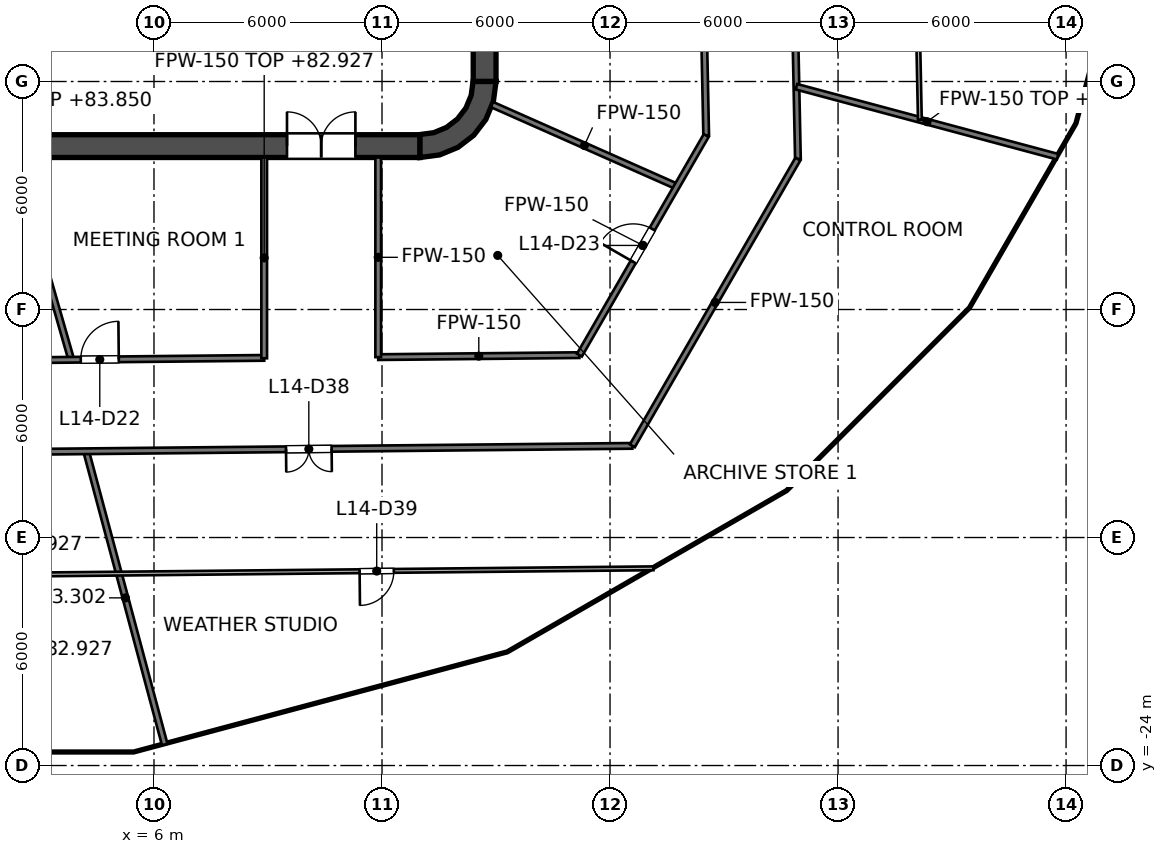
"""IFC4 building model, lengths in metres.
Left out: names, types, materials, properties, quantities, classifications, styles, units other than length and angle.
Written with IfcOpenShell. Run it as: python <this file> out.ifc"""

import sys

from ifc_helpers import new_model, si_unit, direction, frame, frame_2d, origin, place, context, subcontext, project, spatial, polyline, rectangle, outline, extrude, element, fill, save


model = new_model("IFC4")
c1 = context("Model", 3, precision=1e-05, world=origin(), true_north=direction((0.0, 1.0)))
c2 = subcontext(c1, "Body", "Model", "MODEL_VIEW")
j1 = project(units=[si_unit("LENGTHUNIT", "METRE"), si_unit("PLANEANGLEUNIT", "RADIAN")], contexts=[c1])
p1 = place(None, origin())
s1 = spatial("IfcSite", under=j1, at=p1, CompositionType="ELEMENT")
p2 = place(p1, origin())
s2 = spatial("IfcBuilding", under=s1, at=p2, CompositionType="ELEMENT")
p3 = place(p2, frame((0.0, 0.0, 79.8)))
s3 = spatial("IfcBuildingStorey", under=s2, at=p3, CompositionType="ELEMENT", Elevation=79.8)
p4 = place(p3, frame((-13.0, -7.7, 0.0), z_axis=(0.0, 0.0, 1.0), x_axis=(1.0, 0.0, 0.0)))
e1 = element("IfcWall", 1, at=p4, inside=s3, PredefinedType="SHEAR", context=c2, shape_type="SweptSolid", body=[
    extrude(rectangle(XDim=26.0, YDim=0.6, at=frame_2d((13.0, 0.0))), origin(), (0.0, 0.0, 1.0), 4.2),
])
p5 = place(p4, frame((1.7, 0.0, 0.0)))
e2 = element("IfcOpeningElement", 2, at=p5, cuts=e1, PredefinedType="OPENING", context=c2, shape_type="SweptSolid", body=[
    extrude(rectangle(XDim=1.8, YDim=2.1, at=frame_2d((0.9, 1.05))), frame((0.0, 0.3, 0.0), z_axis=(0.0, -1.0, 0.0), x_axis=(1.0, 0.0, 0.0)), (0.0, 0.0, 1.0), 0.6),
])
p6 = place(p4, frame((22.5, 0.0, 0.0)))
e3 = element("IfcOpeningElement", 3, at=p6, cuts=e1, PredefinedType="OPENING", context=c2, shape_type="SweptSolid", body=[
    extrude(rectangle(XDim=1.8, YDim=2.1, at=frame_2d((0.9, 1.05))), frame((0.0, 0.3, 0.0), z_axis=(0.0, -1.0, 0.0), x_axis=(1.0, 0.0, 0.0)), (0.0, 0.0, 1.0), 0.6),
])
p7 = place(p3, frame((14.7, -6.0, 0.0), z_axis=(0.0, 0.0, 1.0), x_axis=(0.0, 1.0, 0.0)))
e4 = element("IfcWall", 4, at=p7, inside=s3, PredefinedType="SHEAR", context=c2, shape_type="SweptSolid", body=[
    extrude(rectangle(XDim=12.0, YDim=0.6, at=frame_2d((6.0, 0.0))), origin(), (0.0, 0.0, 1.0), 4.2),
])
p8 = place(p3, origin())
e5 = element("IfcWall", 5, at=p8, inside=s3, PredefinedType="SHEAR", context=c2, shape_type="SweptSolid", body=[
    extrude(outline(polyline([(15.0, -6.0), (14.395, -6.0), (14.347, -6.361), (14.208, -6.698), (13.986, -6.986), (13.698, -7.208), (13.361, -7.347), (13.0, -7.395), (13.0, -8.0), (13.518, -7.932), (14.0, -7.732), (14.414, -7.414), (14.732, -7.0), (14.932, -6.518), (15.0, -6.0)])), origin(), (0.0, 0.0, 1.0), 4.2),
])
p9 = place(p3, frame((9.0, -6.6, 0.0), z_axis=(0.0, 0.0, 1.0), x_axis=(0.0, 1.0, 0.0)))
e6 = element("IfcWall", 6, at=p9, inside=s3, PredefinedType="SOLIDWALL", context=c2, shape_type="SweptSolid", body=[
    extrude(rectangle(XDim=2.5, YDim=0.25, at=frame_2d((1.25, 0.0))), origin(), (0.0, 0.0, 1.0), 4.05),
])
p10 = place(p9, frame((0.65, 0.0, 0.0)))
e7 = element("IfcOpeningElement", 7, at=p10, cuts=e6, PredefinedType="OPENING", context=c2, shape_type="SweptSolid", body=[
    extrude(rectangle(XDim=1.2, YDim=2.1, at=frame_2d((0.6, 1.05))), frame((0.0, 0.125, 0.0), z_axis=(0.0, -1.0, 0.0), x_axis=(1.0, 0.0, 0.0)), (0.0, 0.0, 1.0), 0.25),
])
p11 = place(p3, frame((-9.125, -7.0, 0.0), z_axis=(0.0, 0.0, 1.0), x_axis=(1.0, 0.0, 0.0)))
e8 = element("IfcWall", 8, at=p11, inside=s3, PredefinedType="SOLIDWALL", context=c2, shape_type="SweptSolid", body=[
    extrude(rectangle(XDim=18.25, YDim=0.8, at=frame_2d((9.125, 0.0))), origin(), (0.0, 0.0, 1.0), 4.05),
])
p12 = place(p3, frame((11.8, -7.4, 0.0), z_axis=(0.0, 0.0, 1.0), x_axis=(0.0, 1.0, 0.0)))
e9 = element("IfcWall", 9, at=p12, inside=s3, PredefinedType="SOLIDWALL", context=c2, shape_type="SweptSolid", body=[
    extrude(rectangle(XDim=14.8, YDim=0.4, at=frame_2d((7.4, 0.0))), origin(), (0.0, 0.0, 1.0), 4.05),
])
p13 = place(p12, frame((11.2, 0.0, 0.0)))
e10 = element("IfcOpeningElement", 10, at=p13, cuts=e9, PredefinedType="OPENING", context=c2, shape_type="SweptSolid", body=[
    extrude(rectangle(XDim=1.1, YDim=2.1, at=frame_2d((0.55, 1.05))), frame((0.0, 0.2, 0.0), z_axis=(0.0, -1.0, 0.0), x_axis=(1.0, 0.0, 0.0)), (0.0, 0.0, 1.0), 0.4),
])
p14 = place(p12, frame((8.3, 0.0, 0.0)))
e11 = element("IfcOpeningElement", 11, at=p14, cuts=e9, PredefinedType="OPENING", context=c2, shape_type="SweptSolid", body=[
    extrude(rectangle(XDim=1.1, YDim=2.1, at=frame_2d((0.55, 1.05))), frame((0.0, 0.2, 0.0), z_axis=(0.0, -1.0, 0.0), x_axis=(1.0, 0.0, 0.0)), (0.0, 0.0, 1.0), 0.4),
])
p15 = place(p12, frame((5.4, 0.0, 0.0)))
e12 = element("IfcOpeningElement", 12, at=p15, cuts=e9, PredefinedType="OPENING", context=c2, shape_type="SweptSolid", body=[
    extrude(rectangle(XDim=1.1, YDim=2.1, at=frame_2d((0.55, 1.05))), frame((0.0, 0.2, 0.0), z_axis=(0.0, -1.0, 0.0), x_axis=(1.0, 0.0, 0.0)), (0.0, 0.0, 1.0), 0.4),
])
p16 = place(p12, frame((13.552, 0.0, 0.0)))
e13 = element("IfcOpeningElement", 13, at=p16, cuts=e9, PredefinedType="OPENING", context=c2, shape_type="SweptSolid", body=[
    extrude(rectangle(XDim=0.9, YDim=2.1, at=frame_2d((0.45, 1.05))), frame((0.0, 0.2, 0.0), z_axis=(0.0, -1.0, 0.0), x_axis=(1.0, 0.0, 0.0)), (0.0, 0.0, 1.0), 0.4),
])
p17 = place(p12, frame((0.347, 0.0, 0.0)))
e14 = element("IfcOpeningElement", 14, at=p17, cuts=e9, PredefinedType="OPENING", context=c2, shape_type="SweptSolid", body=[
    extrude(rectangle(XDim=0.9, YDim=2.1, at=frame_2d((0.45, 1.05))), frame((0.0, 0.2, 0.0), z_axis=(0.0, -1.0, 0.0), x_axis=(1.0, 0.0, 0.0)), (0.0, 0.0, 1.0), 0.4),
])
e15 = element("IfcWall", 15, at=p8, inside=s3, PredefinedType="SOLIDWALL", context=c2, shape_type="SweptSolid", body=[
    extrude(outline(polyline([(12.0, -5.675), (12.0, -5.925), (14.15, -5.925), (14.4, -5.925), (14.4, -5.675), (14.4, -3.025), (14.4, -2.775), (14.4, -0.125), (14.4, 0.125), (14.4, 2.775), (14.4, 3.025), (14.4, 5.675), (14.4, 5.925), (14.15, 5.925), (12.0, 5.925), (12.0, 5.675), (14.15, 5.675), (14.15, 3.025), (12.0, 3.025), (12.0, 2.775), (14.15, 2.775), (14.15, 0.125), (12.0, 0.125), (12.0, -0.125), (14.15, -0.125), (14.15, -2.775), (12.0, -2.775), (12.0, -3.025), (14.15, -3.025), (14.15, -5.675), (12.0, -5.675)])), origin(), (0.0, 0.0, 1.0), 4.05),
])
p18 = place(p3, frame((20.167, 10.213, 0.0), z_axis=(0.0, 0.0, 1.0), x_axis=(0.020597058382, -0.999787858091, 0.0)))
e16 = element("IfcWall", 16, at=p18, inside=s3, PredefinedType="PARTITIONING", context=c2, shape_type="SweptSolid", body=[
    extrude(rectangle(XDim=17.637, YDim=0.15, at=frame_2d((8.819, 0.0))), origin(), (0.0, 0.0, 1.0), 3.118),
])
p19 = place(p18, frame((10.508, 0.0, 0.0)))
e17 = element("IfcOpeningElement", 17, at=p19, cuts=e16, PredefinedType="OPENING", context=c2, shape_type="SweptSolid", body=[
    extrude(rectangle(XDim=1.0, YDim=2.1, at=frame_2d((0.5, 1.05))), frame((0.0, 0.075, 0.0), z_axis=(0.0, -1.0, 0.0), x_axis=(1.0, 0.0, 0.0)), (0.0, 0.0, 1.0), 0.15),
])
p20 = place(p18, frame((5.09, 0.0, 0.0)))
e18 = element("IfcOpeningElement", 18, at=p20, cuts=e16, PredefinedType="OPENING", context=c2, shape_type="SweptSolid", body=[
    extrude(rectangle(XDim=1.0, YDim=2.1, at=frame_2d((0.5, 1.05))), frame((0.0, 0.075, 0.0), z_axis=(0.0, -1.0, 0.0), x_axis=(1.0, 0.0, 0.0)), (0.0, 0.0, 1.0), 0.15),
])
p21 = place(p3, frame((22.539, 11.615, 0.0), z_axis=(0.0, 0.0, 1.0), x_axis=(0.020589093921, -0.999788022138, 0.0)))
e19 = element("IfcWall", 19, at=p21, inside=s3, PredefinedType="PARTITIONING", context=c2, shape_type="SweptSolid", body=[
    extrude(rectangle(XDim=19.66, YDim=0.15, at=frame_2d((9.83, 0.0))), origin(), (0.0, 0.0, 1.0), 3.118),
])
p22 = place(p21, frame((15.745, 0.0, 0.0)))
e20 = element("IfcOpeningElement", 20, at=p22, cuts=e19, PredefinedType="OPENING", context=c2, shape_type="SweptSolid", body=[
    extrude(rectangle(XDim=1.0, YDim=2.1, at=frame_2d((0.5, 1.05))), frame((0.0, 0.075, 0.0), z_axis=(0.0, -1.0, 0.0), x_axis=(1.0, 0.0, 0.0)), (0.0, 0.0, 1.0), 0.15),
])
p23 = place(p21, frame((9.331, 0.0, 0.0)))
e21 = element("IfcOpeningElement", 21, at=p23, cuts=e19, PredefinedType="OPENING", context=c2, shape_type="SweptSolid", body=[
    extrude(rectangle(XDim=1.0, YDim=2.1, at=frame_2d((0.5, 1.05))), frame((0.0, 0.075, 0.0), z_axis=(0.0, -1.0, 0.0), x_axis=(1.0, 0.0, 0.0)), (0.0, 0.0, 1.0), 0.15),
])
p24 = place(p3, frame((4.215, -15.73, 0.0), z_axis=(0.0, 0.0, 1.0), x_axis=(0.258746779093, -0.965945187011, 0.0)))
e22 = element("IfcWall", 22, at=p24, inside=s3, PredefinedType="PARTITIONING", context=c2, shape_type="SweptSolid", body=[
    extrude(rectangle(XDim=7.988, YDim=0.15, at=frame_2d((3.994, 0.0))), origin(), (0.0, 0.0, 1.0), 3.502),
])
p25 = place(p3, frame((2.296, -8.0, 0.0), z_axis=(0.0, 0.0, 1.0), x_axis=(0.275935525478, -0.961176147113, 0.0)))
e23 = element("IfcWall", 23, at=p25, inside=s3, PredefinedType="PARTITIONING", context=c2, shape_type="SweptSolid", body=[
    extrude(rectangle(XDim=5.548, YDim=0.15, at=frame_2d((2.774, 0.0))), origin(), (0.0, 0.0, 1.0), 4.05),
])
p26 = place(p3, frame((14.895, -6.607, 0.0), z_axis=(0.0, 0.0, 1.0), x_axis=(0.914233271379, -0.405188259337, 0.0)))
e24 = element("IfcWall", 24, at=p26, inside=s3, PredefinedType="PARTITIONING", context=c2, shape_type="SweptSolid", body=[
    extrude(rectangle(XDim=5.317, YDim=0.15, at=frame_2d((2.659, 0.0))), origin(), (0.0, 0.0, 1.0), 3.195),
])
p27 = place(p3, frame((22.905, -6.138, 0.0), z_axis=(0.0, 0.0, 1.0), x_axis=(0.965925533901, -0.258820136309, 0.0)))
e25 = element("IfcWall", 25, at=p27, inside=s3, PredefinedType="PARTITIONING", context=c2, shape_type="SweptSolid", body=[
    extrude(rectangle(XDim=7.114, YDim=0.15, at=frame_2d((3.557, 0.0))), origin(), (0.0, 0.0, 1.0), 3.727),
])
p28 = place(p3, frame((-14.534, -15.916, 0.0), z_axis=(0.0, 0.0, 1.0), x_axis=(0.99995100325, 0.009899045409, 0.0)))
e26 = element("IfcWall", 26, at=p28, inside=s3, PredefinedType="PARTITIONING", context=c2, shape_type="SweptSolid", body=[
    extrude(rectangle(XDim=33.123, YDim=0.15, at=frame_2d((16.561, 0.0))), origin(), (0.0, 0.0, 1.0), 3.127),
])
p29 = place(p28, frame((5.927, 0.0, 0.0)))
e27 = element("IfcOpeningElement", 27, at=p29, cuts=e26, PredefinedType="OPENING", context=c2, shape_type="SweptSolid", body=[
    extrude(rectangle(XDim=1.0, YDim=2.1, at=frame_2d((0.5, 1.05))), frame((0.0, 0.075, 0.0), z_axis=(0.0, -1.0, 0.0), x_axis=(1.0, 0.0, 0.0)), (0.0, 0.0, 1.0), 0.15),
])
p30 = place(p28, frame((15.202, 0.0, 0.0)))
e28 = element("IfcOpeningElement", 28, at=p30, cuts=e26, PredefinedType="OPENING", context=c2, shape_type="SweptSolid", body=[
    extrude(rectangle(XDim=1.0, YDim=2.1, at=frame_2d((0.5, 1.05))), frame((0.0, 0.075, 0.0), z_axis=(0.0, -1.0, 0.0), x_axis=(1.0, 0.0, 0.0)), (0.0, 0.0, 1.0), 0.15),
])
p31 = place(p28, frame((24.01, 0.0, 0.0)))
e29 = element("IfcOpeningElement", 29, at=p31, cuts=e26, PredefinedType="OPENING", context=c2, shape_type="SweptSolid", body=[
    extrude(rectangle(XDim=1.2, YDim=2.1, at=frame_2d((0.6, 1.05))), frame((0.0, 0.075, 0.0), z_axis=(0.0, -1.0, 0.0), x_axis=(1.0, 0.0, 0.0)), (0.0, 0.0, 1.0), 0.15),
])
p32 = place(p3, frame((-8.9, -13.449, 0.0), z_axis=(0.0, 0.0, 1.0), x_axis=(0.999950969978, 0.009902405776, 0.0)))
e30 = element("IfcWall", 30, at=p32, inside=s3, PredefinedType="PARTITIONING", context=c2, shape_type="SweptSolid", body=[
    extrude(rectangle(XDim=17.801, YDim=0.15, at=frame_2d((8.9, 0.0))), origin(), (0.0, 0.0, 1.0), 3.127),
])
p33 = place(p32, frame((3.818, 0.0, 0.0)))
e31 = element("IfcOpeningElement", 31, at=p33, cuts=e30, PredefinedType="OPENING", context=c2, shape_type="SweptSolid", body=[
    extrude(rectangle(XDim=1.0, YDim=2.1, at=frame_2d((0.5, 1.05))), frame((0.0, 0.075, 0.0), z_axis=(0.0, -1.0, 0.0), x_axis=(1.0, 0.0, 0.0)), (0.0, 0.0, 1.0), 0.15),
])
p34 = place(p32, frame((8.391, 0.0, 0.0)))
e32 = element("IfcOpeningElement", 32, at=p34, cuts=e30, PredefinedType="OPENING", context=c2, shape_type="SweptSolid", body=[
    extrude(rectangle(XDim=1.0, YDim=2.1, at=frame_2d((0.5, 1.05))), frame((0.0, 0.075, 0.0), z_axis=(0.0, -1.0, 0.0), x_axis=(1.0, 0.0, 0.0)), (0.0, 0.0, 1.0), 0.15),
])
p35 = place(p32, frame((12.974, 0.0, 0.0)))
e33 = element("IfcOpeningElement", 33, at=p35, cuts=e30, PredefinedType="OPENING", context=c2, shape_type="SweptSolid", body=[
    extrude(rectangle(XDim=1.0, YDim=2.1, at=frame_2d((0.5, 1.05))), frame((0.0, 0.075, 0.0), z_axis=(0.0, -1.0, 0.0), x_axis=(1.0, 0.0, 0.0)), (0.0, 0.0, 1.0), 0.15),
])
p36 = place(p3, frame((11.9, -13.253, 0.0), z_axis=(0.0, 0.0, 1.0), x_axis=(0.999951309192, 0.009868092237, 0.0)))
e34 = element("IfcWall", 34, at=p36, inside=s3, PredefinedType="PARTITIONING", context=c2, shape_type="SweptSolid", body=[
    extrude(rectangle(XDim=5.294, YDim=0.15, at=frame_2d((2.647, 0.0))), origin(), (0.0, 0.0, 1.0), 3.195),
])
p37 = place(p3, frame((18.587, -15.587, 0.0), z_axis=(0.0, 0.0, 1.0), x_axis=(0.499993286632, 0.866029279715, 0.0)))
e35 = element("IfcWall", 35, at=p37, inside=s3, PredefinedType="PARTITIONING", context=c2, shape_type="SweptSolid", body=[
    extrude(rectangle(XDim=8.713, YDim=0.15, at=frame_2d((4.357, 0.0))), origin(), (0.0, 0.0, 1.0), 3.195),
])
p38 = place(p3, frame((17.194, -13.201, 0.0), z_axis=(0.0, 0.0, 1.0), x_axis=(0.499983182885, 0.866035112932, 0.0)))
e36 = element("IfcWall", 36, at=p38, inside=s3, PredefinedType="PARTITIONING", context=c2, shape_type="SweptSolid", body=[
    extrude(rectangle(XDim=6.674, YDim=0.15, at=frame_2d((3.337, 0.0))), origin(), (0.0, 0.0, 1.0), 3.195),
])
p39 = place(p38, frame((2.834, 0.0, 0.0)))
e37 = element("IfcOpeningElement", 37, at=p39, cuts=e36, PredefinedType="OPENING", context=c2, shape_type="SweptSolid", body=[
    extrude(rectangle(XDim=1.0, YDim=2.1, at=frame_2d((0.5, 1.05))), frame((0.0, 0.075, 0.0), z_axis=(0.0, -1.0, 0.0), x_axis=(1.0, 0.0, 0.0)), (0.0, 0.0, 1.0), 0.15),
])
p40 = place(p3, frame((11.9, -13.253, 0.0), z_axis=(0.0, 0.0, 1.0), x_axis=(0.0, 1.0, 0.0)))
e38 = element("IfcWall", 38, at=p40, inside=s3, PredefinedType="PARTITIONING", context=c2, shape_type="SweptSolid", body=[
    extrude(rectangle(XDim=5.253, YDim=0.15, at=frame_2d((2.626, 0.0))), origin(), (0.0, 0.0, 1.0), 3.195),
])
p41 = place(p3, frame((8.9, -13.283, 0.0), z_axis=(0.0, 0.0, 1.0), x_axis=(0.0, 1.0, 0.0)))
e39 = element("IfcWall", 39, at=p41, inside=s3, PredefinedType="PARTITIONING", context=c2, shape_type="SweptSolid", body=[
    extrude(rectangle(XDim=5.283, YDim=0.15, at=frame_2d((2.642, 0.0))), origin(), (0.0, 0.0, 1.0), 3.127),
])
p42 = place(p3, frame((25.731, 13.502, 0.0), z_axis=(0.0, 0.0, 1.0), x_axis=(0.020564874759, -0.999788520601, 0.0)))
e40 = element("IfcWall", 40, at=p42, inside=s3, PredefinedType="PARTITIONING", context=c2, shape_type="SweptSolid", body=[
    extrude(rectangle(XDim=20.514, YDim=0.1, at=frame_2d((10.257, 0.0))), origin(), (0.0, 0.0, 1.0), 3.118),
])
p43 = place(p42, frame((8.027, 0.0, 0.0)))
e41 = element("IfcOpeningElement", 41, at=p43, cuts=e40, PredefinedType="OPENING", context=c2, shape_type="SweptSolid", body=[
    extrude(rectangle(XDim=0.9, YDim=2.1, at=frame_2d((0.45, 1.05))), frame((0.0, 0.05, 0.0), z_axis=(0.0, -1.0, 0.0), x_axis=(1.0, 0.0, 0.0)), (0.0, 0.0, 1.0), 0.1),
])
p44 = place(p3, frame((-15.161, -19.152, 0.0), z_axis=(0.0, 0.0, 1.0), x_axis=(0.999950294367, 0.009970395935, 0.0)))
e42 = element("IfcWall", 42, at=p44, inside=s3, PredefinedType="PARTITIONING", context=c2, shape_type="SweptSolid", body=[
    extrude(rectangle(XDim=34.306, YDim=0.1, at=frame_2d((17.153, 0.0))), origin(), (0.0, 0.0, 1.0), 3.127),
])
p45 = place(p44, frame((6.111, 0.0, 0.0)))
e43 = element("IfcOpeningElement", 43, at=p45, cuts=e42, PredefinedType="OPENING", context=c2, shape_type="SweptSolid", body=[
    extrude(rectangle(XDim=0.9, YDim=2.1, at=frame_2d((0.45, 1.05))), frame((0.0, 0.05, 0.0), z_axis=(0.0, -1.0, 0.0), x_axis=(1.0, 0.0, 0.0)), (0.0, 0.0, 1.0), 0.1),
])
p46 = place(p44, frame((26.573, 0.0, 0.0)))
e44 = element("IfcOpeningElement", 44, at=p46, cuts=e42, PredefinedType="OPENING", context=c2, shape_type="SweptSolid", body=[
    extrude(rectangle(XDim=0.9, YDim=2.1, at=frame_2d((0.45, 1.05))), frame((0.0, 0.05, 0.0), z_axis=(0.0, -1.0, 0.0), x_axis=(1.0, 0.0, 0.0)), (0.0, 0.0, 1.0), 0.1),
])
p47 = place(p10, origin())
e45 = element("IfcDoor", 45, at=p47, inside=s3, OperationType="SINGLE_SWING_LEFT", PredefinedType="DOOR", context=c2, shape_type="SweptSolid", body=[
    extrude(rectangle(XDim=1.2, YDim=2.1, at=frame_2d((0.6, 1.05))), frame((0.0, 0.025, 0.0), z_axis=(0.0, -1.0, 0.0), x_axis=(1.0, 0.0, 0.0)), (0.0, 0.0, 1.0), 0.05),
])
fill(e7, e45)
p48 = place(p17, origin())
e46 = element("IfcDoor", 46, at=p48, inside=s3, OperationType="SINGLE_SWING_RIGHT", PredefinedType="DOOR", context=c2, shape_type="SweptSolid", body=[
    extrude(rectangle(XDim=0.9, YDim=2.1, at=frame_2d((0.45, 1.05))), frame((0.0, 0.025, 0.0), z_axis=(0.0, -1.0, 0.0), x_axis=(1.0, 0.0, 0.0)), (0.0, 0.0, 1.0), 0.05),
])
fill(e14, e46)
p49 = place(p6, origin())
e47 = element("IfcDoor", 47, at=p49, inside=s3, OperationType="DOUBLE_DOOR_SINGLE_SWING", PredefinedType="DOOR", context=c2, shape_type="SweptSolid", body=[
    extrude(rectangle(XDim=1.8, YDim=2.1, at=frame_2d((0.9, 1.05))), frame((0.0, 0.025, 0.0), z_axis=(0.0, -1.0, 0.0), x_axis=(1.0, 0.0, 0.0)), (0.0, 0.0, 1.0), 0.05),
])
fill(e3, e47)
p50 = place(p35, origin())
e48 = element("IfcDoor", 48, at=p50, inside=s3, OperationType="SINGLE_SWING_RIGHT", PredefinedType="DOOR", context=c2, shape_type="SweptSolid", body=[
    extrude(rectangle(XDim=1.0, YDim=2.1, at=frame_2d((0.5, 1.05))), frame((0.0, 0.025, 0.0), z_axis=(0.0, -1.0, 0.0), x_axis=(1.0, 0.0, 0.0)), (0.0, 0.0, 1.0), 0.05),
])
fill(e33, e48)
p51 = place(p39, origin())
e49 = element("IfcDoor", 49, at=p51, inside=s3, OperationType="SINGLE_SWING_LEFT", PredefinedType="DOOR", context=c2, shape_type="SweptSolid", body=[
    extrude(rectangle(XDim=1.0, YDim=2.1, at=frame_2d((0.5, 1.05))), frame((0.0, 0.025, 0.0), z_axis=(0.0, -1.0, 0.0), x_axis=(1.0, 0.0, 0.0)), (0.0, 0.0, 1.0), 0.05),
])
fill(e37, e49)
p52 = place(p31, origin())
e50 = element("IfcDoor", 50, at=p52, inside=s3, OperationType="DOUBLE_DOOR_SINGLE_SWING", PredefinedType="DOOR", context=c2, shape_type="SweptSolid", body=[
    extrude(rectangle(XDim=1.2, YDim=2.1, at=frame_2d((0.6, 1.05))), frame((0.0, 0.025, 0.0), z_axis=(0.0, -1.0, 0.0), x_axis=(1.0, 0.0, 0.0)), (0.0, 0.0, 1.0), 0.05),
])
fill(e29, e50)
p53 = place(p46, origin())
e51 = element("IfcDoor", 51, at=p53, inside=s3, OperationType="SINGLE_SWING_LEFT", PredefinedType="DOOR", context=c2, shape_type="SweptSolid", body=[
    extrude(rectangle(XDim=0.9, YDim=2.1, at=frame_2d((0.45, 1.05))), frame((0.0, 0.025, 0.0), z_axis=(0.0, -1.0, 0.0), x_axis=(1.0, 0.0, 0.0)), (0.0, 0.0, 1.0), 0.05),
])
fill(e44, e51)
save(model, sys.argv[1])
